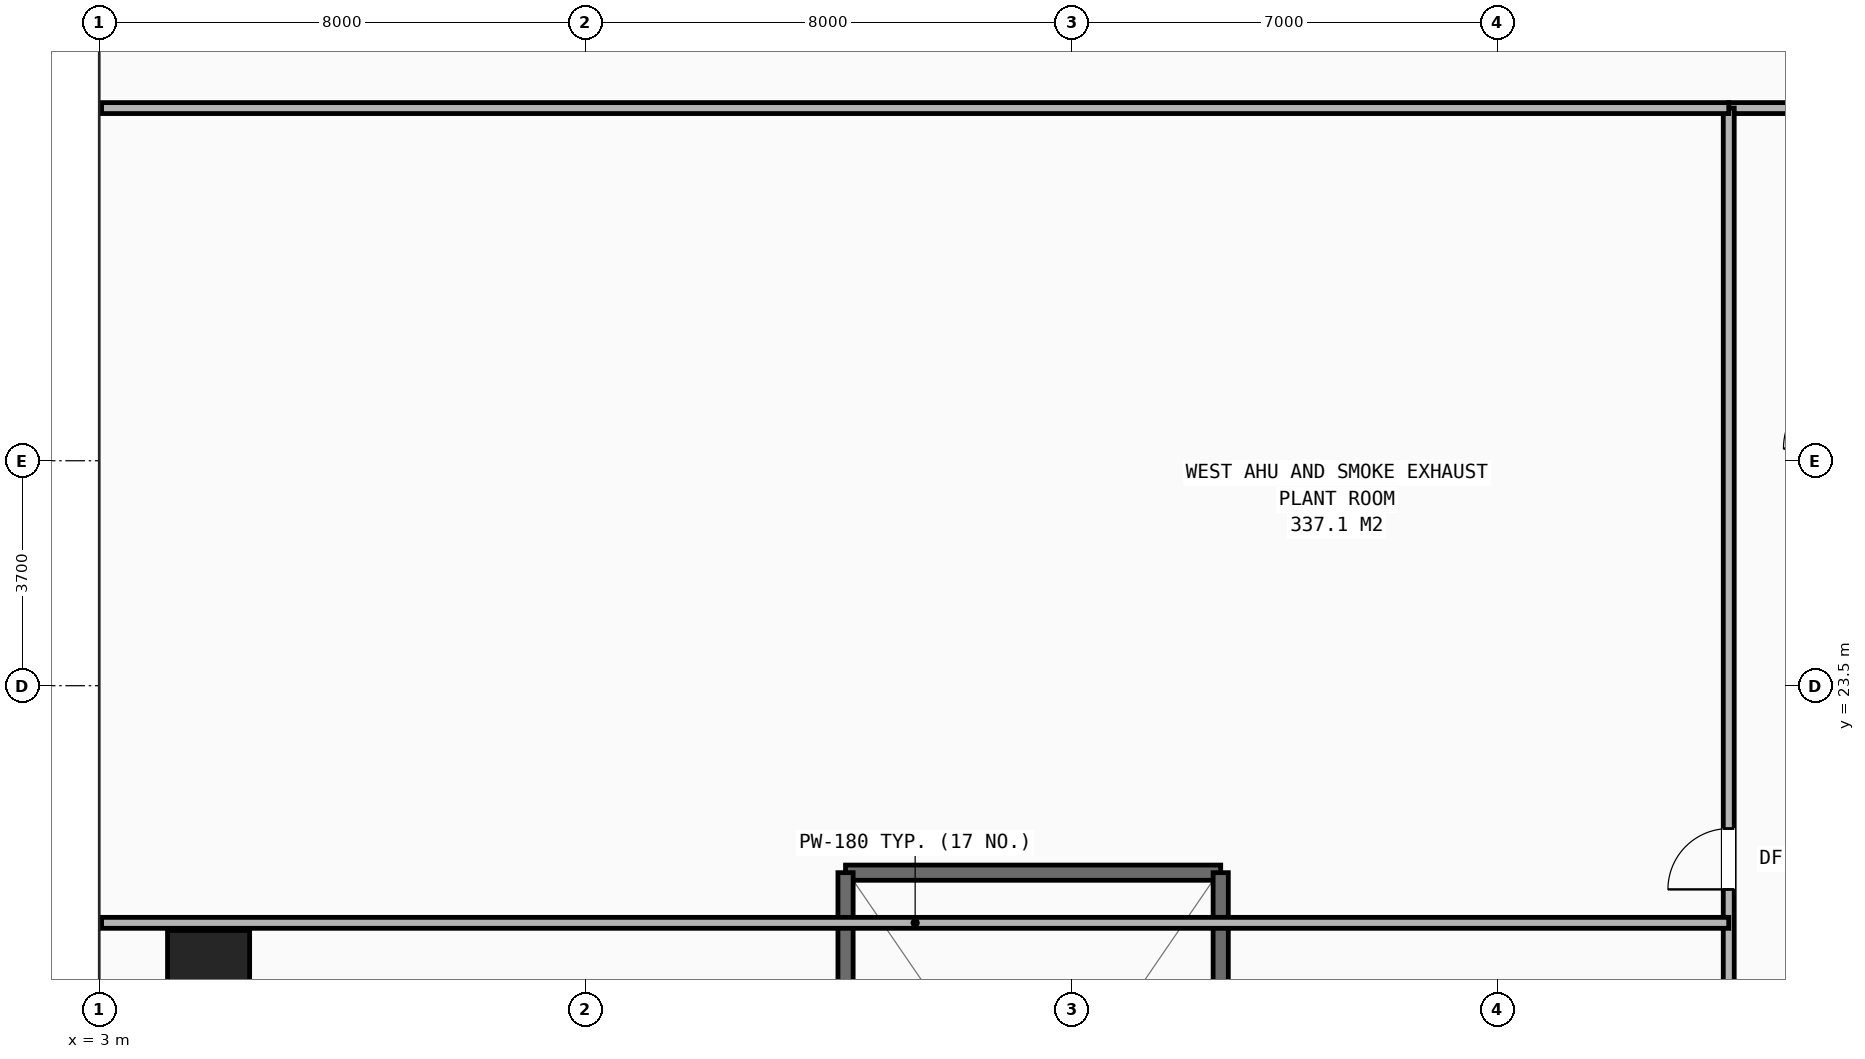
"""IFC4 building model, lengths in metres.
Left out: names, types, materials, properties, quantities, classifications, styles, units other than length and angle.
Written with IfcOpenShell. Run it as: python <this file> out.ifc"""

import sys

from ifc_helpers import new_model, si_unit, direction, frame, frame_2d, origin, origin_2d, place, context, subcontext, project, spatial, rectangle, hollow_rectangle, extrude, element, fill, save


model = new_model("IFC4")
c1 = context("Model", 3, precision=1e-05, world=origin(), true_north=direction((0.0, 1.0)))
c2 = subcontext(c1, "Body", "Model", "MODEL_VIEW")
j1 = project(units=[si_unit("LENGTHUNIT", "METRE"), si_unit("PLANEANGLEUNIT", "RADIAN")], contexts=[c1])
p1 = place(None, origin())
s1 = spatial("IfcSite", under=j1, at=p1, CompositionType="ELEMENT")
p2 = place(p1, origin())
s2 = spatial("IfcBuilding", under=s1, at=p2, CompositionType="ELEMENT")
p3 = place(p2, frame((0.0, 0.0, 22.0)))
s3 = spatial("IfcBuildingStorey", under=s2, at=p3, CompositionType="ELEMENT", Elevation=22.0)
p4 = place(p3, frame((4.8, 18.8, 0.0), z_axis=(0.0, 0.0, 1.0), x_axis=(1.0, 0.0, 0.0)))
e1 = element("IfcColumn", 1, at=p4, inside=s3, PredefinedType="COLUMN", context=c2, shape_type="SweptSolid", body=[
    extrude(hollow_rectangle(XDim=1.35, YDim=1.35, WallThickness=0.085, at=origin_2d()), origin(), (0.0, 0.0, 1.0), 5.2),
])
p5 = place(p3, frame((15.275, 20.425, 0.0), z_axis=(0.0, 0.0, 1.0), x_axis=(1.0, 0.0, 0.0)))
e2 = element("IfcWall", 2, at=p5, inside=s3, PredefinedType="SHEAR", context=c2, shape_type="SweptSolid", body=[
    extrude(rectangle(XDim=6.17, YDim=0.25, at=frame_2d((3.085, 0.0))), origin(), (0.0, 0.0, 1.0), 4.78),
])
p6 = place(p3, frame((15.275, 8.675, 0.0), z_axis=(0.0, 0.0, 1.0), x_axis=(0.0, 1.0, 0.0)))
e3 = element("IfcWall", 3, at=p6, inside=s3, PredefinedType="SHEAR", context=c2, shape_type="SweptSolid", body=[
    extrude(rectangle(XDim=11.75, YDim=0.25, at=frame_2d((5.875, 0.0))), origin(), (0.0, 0.0, 1.0), 4.78),
])
p7 = place(p3, frame((21.445, 8.675, 0.0), z_axis=(0.0, 0.0, 1.0), x_axis=(0.0, 1.0, 0.0)))
e4 = element("IfcWall", 4, at=p7, inside=s3, PredefinedType="SHEAR", context=c2, shape_type="SweptSolid", body=[
    extrude(rectangle(XDim=11.75, YDim=0.25, at=frame_2d((5.875, 0.0))), origin(), (0.0, 0.0, 1.0), 4.78),
])
p8 = place(p7, frame((0.55, 0.0, 0.0)))
e5 = element("IfcOpeningElement", 5, at=p8, cuts=e4, PredefinedType="OPENING", context=c2, shape_type="SweptSolid", body=[
    extrude(rectangle(XDim=1.1, YDim=2.15, at=frame_2d((0.55, 1.075))), frame((0.0, 0.135, 0.0), z_axis=(0.0, -1.0, 0.0), x_axis=(1.0, 0.0, 0.0)), (0.0, 0.0, 1.0), 0.27),
])
p9 = place(p3, frame((29.8, 33.0, 0.0), z_axis=(0.0, 0.0, 1.0), x_axis=(1.0, 0.0, 0.0)))
e6 = element("IfcWall", 6, at=p9, inside=s3, PredefinedType="PARTITIONING", context=c2, shape_type="SweptSolid", body=[
    extrude(rectangle(XDim=20.4, YDim=0.18, at=frame_2d((10.2, 0.0))), origin(), (0.0, 0.0, 1.0), 2.52),
])
p10 = place(p9, frame((3.4, 0.0, 0.0)))
e7 = element("IfcOpeningElement", 7, at=p10, cuts=e6, PredefinedType="OPENING", context=c2, shape_type="SweptSolid", body=[
    extrude(rectangle(XDim=1.0, YDim=2.15, at=frame_2d((0.5, 1.075))), frame((0.0, 0.1, 0.0), z_axis=(0.0, -1.0, 0.0), x_axis=(1.0, 0.0, 0.0)), (0.0, 0.0, 1.0), 0.2),
])
p11 = place(p9, frame((6.8, 0.0, 0.0)))
e8 = element("IfcOpeningElement", 8, at=p11, cuts=e6, PredefinedType="OPENING", context=c2, shape_type="SweptSolid", body=[
    extrude(rectangle(XDim=1.0, YDim=2.15, at=frame_2d((0.5, 1.075))), frame((0.0, 0.1, 0.0), z_axis=(0.0, -1.0, 0.0), x_axis=(1.0, 0.0, 0.0)), (0.0, 0.0, 1.0), 0.2),
])
p12 = place(p9, frame((11.4, 0.0, 0.0)))
e9 = element("IfcOpeningElement", 9, at=p12, cuts=e6, PredefinedType="OPENING", context=c2, shape_type="SweptSolid", body=[
    extrude(rectangle(XDim=1.0, YDim=2.15, at=frame_2d((0.5, 1.075))), frame((0.0, 0.1, 0.0), z_axis=(0.0, -1.0, 0.0), x_axis=(1.0, 0.0, 0.0)), (0.0, 0.0, 1.0), 0.2),
])
p13 = place(p9, frame((16.0, 0.0, 0.0)))
e10 = element("IfcOpeningElement", 10, at=p13, cuts=e6, PredefinedType="OPENING", context=c2, shape_type="SweptSolid", body=[
    extrude(rectangle(XDim=1.0, YDim=2.15, at=frame_2d((0.5, 1.075))), frame((0.0, 0.1, 0.0), z_axis=(0.0, -1.0, 0.0), x_axis=(1.0, 0.0, 0.0)), (0.0, 0.0, 1.0), 0.2),
])
p14 = place(p3, frame((29.8, 14.2, 0.0), z_axis=(0.0, 0.0, 1.0), x_axis=(0.0, 1.0, 0.0)))
e11 = element("IfcWall", 11, at=p14, inside=s3, PredefinedType="PARTITIONING", context=c2, shape_type="SweptSolid", body=[
    extrude(rectangle(XDim=18.8, YDim=0.18, at=frame_2d((9.4, 0.0))), origin(), (0.0, 0.0, 1.0), 2.52),
])
p15 = place(p14, frame((5.95, 0.0, 0.0)))
e12 = element("IfcOpeningElement", 12, at=p15, cuts=e11, PredefinedType="OPENING", context=c2, shape_type="SweptSolid", body=[
    extrude(rectangle(XDim=1.0, YDim=2.15, at=frame_2d((0.5, 1.075))), frame((0.0, 0.1, 0.0), z_axis=(0.0, -1.0, 0.0), x_axis=(1.0, 0.0, 0.0)), (0.0, 0.0, 1.0), 0.2),
])
for number, where, z_axis, x_axis in (
    (13, (3.04, 19.6, 0.0), (0.0, 0.0, 1.0), (1.0, 0.0, 0.0)),
    (14, (3.04, 33.0, 0.0), (0.0, 0.0, 1.0), (1.0, 0.0, 0.0)),
):
    element("IfcWall", number, at=place(p3, frame(where, z_axis=z_axis, x_axis=x_axis)), inside=s3, PredefinedType="PARTITIONING", context=c2, shape_type="SweptSolid", body=[
        extrude(rectangle(XDim=26.76, YDim=0.18, at=frame_2d((13.38, 0.0))), origin(), (0.0, 0.0, 1.0), 2.52),
    ])
p16 = place(p15, origin())
e15 = element("IfcDoor", 15, at=p16, inside=s3, OperationType="SINGLE_SWING_LEFT", PredefinedType="DOOR", context=c2, shape_type="SweptSolid", body=[
    extrude(rectangle(XDim=1.0, YDim=2.15, at=frame_2d((0.5, 1.075))), frame((0.0, 0.025, 0.0), z_axis=(0.0, -1.0, 0.0), x_axis=(1.0, 0.0, 0.0)), (0.0, 0.0, 1.0), 0.05),
])
fill(e12, e15)
save(model, sys.argv[1])
